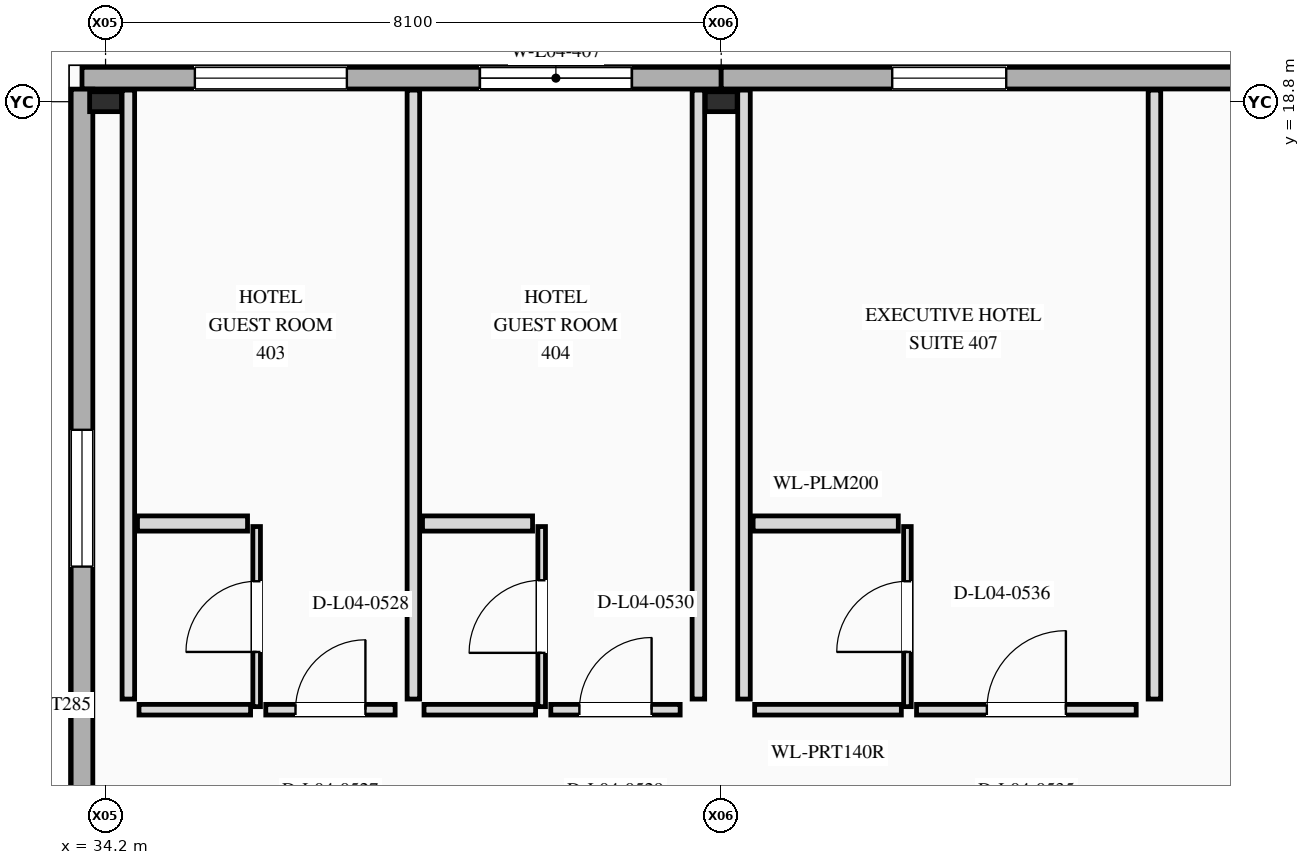
"""IFC4 building model, lengths in metres.
Left out: names, types, materials, properties, quantities, classifications, styles, units other than length and angle.
Written with IfcOpenShell. Run it as: python <this file> out.ifc"""

import sys

from ifc_helpers import new_model, si_unit, direction, frame, frame_2d, origin, origin_2d, place, context, subcontext, project, spatial, rectangle, i_section, extrude, element, fill, save


model = new_model("IFC4")
c1 = context("Model", 3, precision=1e-05, world=origin(), true_north=direction((0.0, 1.0)))
c2 = subcontext(c1, "Body", "Model", "MODEL_VIEW")
j1 = project(units=[si_unit("LENGTHUNIT", "METRE"), si_unit("PLANEANGLEUNIT", "RADIAN")], contexts=[c1])
p1 = place(None, origin())
s1 = spatial("IfcSite", under=j1, at=p1, CompositionType="ELEMENT")
p2 = place(p1, origin())
s2 = spatial("IfcBuilding", under=s1, at=p2, CompositionType="ELEMENT")
p3 = place(p2, frame((0.0, 0.0, 19.5)))
s3 = spatial("IfcBuildingStorey", under=s2, at=p3, CompositionType="ELEMENT", Elevation=19.5)
for number, where, z_axis, x_axis in (
    (1, (34.2, 18.8, 0.0), (0.0, 0.0, 1.0), (0.0, 1.0, 0.0)),
    (2, (42.3, 18.8, 0.0), (0.0, 0.0, 1.0), (0.0, 1.0, 0.0)),
):
    element("IfcColumn", number, at=place(p3, frame(where, z_axis=z_axis, x_axis=x_axis)), inside=s3, PredefinedType="COLUMN", context=c2, shape_type="SweptSolid", body=[
        extrude(i_section(OverallWidth=0.262, OverallDepth=0.419, WebThickness=0.012, FlangeThickness=0.019, at=origin_2d()), origin(), (0.0, 0.0, 1.0), 3.9),
    ])
p4 = place(p3, frame((42.3, 19.11, 0.0), z_axis=(0.0, 0.0, 1.0), x_axis=(-1.0, 0.0, 0.0)))
e3 = element("IfcWall", 3, at=p4, inside=s3, PredefinedType="STANDARD", context=c2, shape_type="SweptSolid", body=[
    extrude(rectangle(XDim=8.41, YDim=0.285, at=frame_2d((4.205, 0.0))), origin(), (0.0, 0.0, 1.0), 3.9),
])
p5 = place(p4, frame((4.925, 0.0, 0.85)))
e4 = element("IfcOpeningElement", 4, at=p5, cuts=e3, PredefinedType="OPENING", context=c2, shape_type="SweptSolid", body=[
    extrude(rectangle(XDim=2.0, YDim=1.65, at=frame_2d((1.0, 0.825))), frame((0.0, 0.152, 0.0), z_axis=(0.0, -1.0, 0.0), x_axis=(1.0, 0.0, 0.0)), (0.0, 0.0, 1.0), 0.305),
])
p6 = place(p4, frame((1.175, 0.0, 0.85)))
e5 = element("IfcOpeningElement", 5, at=p6, cuts=e3, PredefinedType="OPENING", context=c2, shape_type="SweptSolid", body=[
    extrude(rectangle(XDim=2.0, YDim=1.65, at=frame_2d((1.0, 0.825))), frame((0.0, 0.152, 0.0), z_axis=(0.0, -1.0, 0.0), x_axis=(1.0, 0.0, 0.0)), (0.0, 0.0, 1.0), 0.305),
])
p7 = place(p3, frame((50.4, 19.11, 0.0), z_axis=(0.0, 0.0, 1.0), x_axis=(-1.0, 0.0, 0.0)))
e6 = element("IfcWall", 6, at=p7, inside=s3, PredefinedType="STANDARD", context=c2, shape_type="SweptSolid", body=[
    extrude(rectangle(XDim=8.1, YDim=0.285, at=frame_2d((4.05, 0.0))), origin(), (0.0, 0.0, 1.0), 3.9),
])
p8 = place(p7, frame((4.35, 0.0, 0.85)))
e7 = element("IfcOpeningElement", 7, at=p8, cuts=e6, PredefinedType="OPENING", context=c2, shape_type="SweptSolid", body=[
    extrude(rectangle(XDim=1.5, YDim=1.7, at=frame_2d((0.75, 0.85))), frame((0.0, 0.152, 0.0), z_axis=(0.0, -1.0, 0.0), x_axis=(1.0, 0.0, 0.0)), (0.0, 0.0, 1.0), 0.305),
])
p9 = place(p3, frame((33.89, 18.966, 0.0), z_axis=(0.0, 0.0, 1.0), x_axis=(0.0, -1.0, 0.0)))
e8 = element("IfcWall", 8, at=p9, inside=s3, PredefinedType="STANDARD", context=c2, shape_type="SweptSolid", body=[
    extrude(rectangle(XDim=10.766, YDim=0.285, at=frame_2d((5.383, 0.0))), origin(), (0.0, 0.0, 1.0), 3.9),
])
p10 = place(p9, frame((4.483, 0.0, 0.88)))
e9 = element("IfcOpeningElement", 9, at=p10, cuts=e8, PredefinedType="OPENING", context=c2, shape_type="SweptSolid", body=[
    extrude(rectangle(XDim=1.8, YDim=1.8, at=frame_2d((0.9, 0.9))), frame((0.0, 0.152, 0.0), z_axis=(0.0, -1.0, 0.0), x_axis=(1.0, 0.0, 0.0)), (0.0, 0.0, 1.0), 0.305),
])
p11 = place(p3, frame((34.64, 10.8, 0.0), z_axis=(0.0, 0.0, 1.0), x_axis=(1.0, 0.0, 0.0)))
e10 = element("IfcWall", 10, at=p11, inside=s3, PredefinedType="PARTITIONING", context=c2, shape_type="SweptSolid", body=[
    extrude(rectangle(XDim=1.468, YDim=0.14, at=frame_2d((0.734, 0.0))), origin(), (0.0, 0.0, 1.0), 3.585),
])
p12 = place(p3, frame((36.308, 10.8, 0.0), z_axis=(0.0, 0.0, 1.0), x_axis=(1.0, 0.0, 0.0)))
e11 = element("IfcWall", 11, at=p12, inside=s3, PredefinedType="PARTITIONING", context=c2, shape_type="SweptSolid", body=[
    extrude(rectangle(XDim=1.702, YDim=0.14, at=frame_2d((0.851, 0.0))), origin(), (0.0, 0.0, 1.0), 3.585),
])
p13 = place(p12, frame((0.391, 0.0, 0.0)))
e12 = element("IfcOpeningElement", 12, at=p13, cuts=e11, PredefinedType="OPENING", context=c2, shape_type="SweptSolid", body=[
    extrude(rectangle(XDim=0.92, YDim=2.3, at=frame_2d((0.46, 1.15))), frame((0.0, 0.08, 0.0), z_axis=(0.0, -1.0, 0.0), x_axis=(1.0, 0.0, 0.0)), (0.0, 0.0, 1.0), 0.16),
])
p14 = place(p3, frame((34.5, 10.94, 0.0), z_axis=(0.0, 0.0, 1.0), x_axis=(0.0, 1.0, 0.0)))
e13 = element("IfcWall", 13, at=p14, inside=s3, PredefinedType="PARTITIONING", context=c2, shape_type="SweptSolid", body=[
    extrude(rectangle(XDim=8.012, YDim=0.165, at=frame_2d((4.006, 0.0))), origin(), (0.0, 0.0, 1.0), 2.914),
])
p15 = place(p3, frame((38.25, 10.94, 0.0), z_axis=(0.0, 0.0, 1.0), x_axis=(0.0, 1.0, 0.0)))
e14 = element("IfcWall", 14, at=p15, inside=s3, PredefinedType="PARTITIONING", context=c2, shape_type="SweptSolid", body=[
    extrude(rectangle(XDim=8.012, YDim=0.165, at=frame_2d((4.006, 0.0))), origin(), (0.0, 0.0, 1.0), 2.998),
])
p16 = place(p3, frame((36.188, 10.84, 0.0), z_axis=(0.0, 0.0, 1.0), x_axis=(0.0, 1.0, 0.0)))
e15 = element("IfcWall", 15, at=p16, inside=s3, PredefinedType="PARTITIONING", context=c2, shape_type="SweptSolid", body=[
    extrude(rectangle(XDim=2.37, YDim=0.1, at=frame_2d((1.185, 0.0))), origin(), (0.0, 0.0, 1.0), 3.254),
])
p17 = place(p16, frame((0.72, 0.0, 0.0)))
e16 = element("IfcOpeningElement", 16, at=p17, cuts=e15, PredefinedType="OPENING", context=c2, shape_type="SweptSolid", body=[
    extrude(rectangle(XDim=0.93, YDim=2.22, at=frame_2d((0.465, 1.11))), frame((0.0, 0.06, 0.0), z_axis=(0.0, -1.0, 0.0), x_axis=(1.0, 0.0, 0.0)), (0.0, 0.0, 1.0), 0.12),
])
p18 = place(p3, frame((34.62, 13.25, 0.0), z_axis=(0.0, 0.0, 1.0), x_axis=(1.0, 0.0, 0.0)))
e17 = element("IfcWall", 17, at=p18, inside=s3, PredefinedType="PLUMBINGWALL", context=c2, shape_type="SweptSolid", body=[
    extrude(rectangle(XDim=1.448, YDim=0.2, at=frame_2d((0.724, 0.0))), origin(), (0.0, 0.0, 1.0), 3.585),
])
p19 = place(p3, frame((38.39, 10.8, 0.0), z_axis=(0.0, 0.0, 1.0), x_axis=(1.0, 0.0, 0.0)))
e18 = element("IfcWall", 18, at=p19, inside=s3, PredefinedType="PARTITIONING", context=c2, shape_type="SweptSolid", body=[
    extrude(rectangle(XDim=1.468, YDim=0.14, at=frame_2d((0.734, 0.0))), origin(), (0.0, 0.0, 1.0), 3.585),
])
p20 = place(p3, frame((40.058, 10.8, 0.0), z_axis=(0.0, 0.0, 1.0), x_axis=(1.0, 0.0, 0.0)))
e19 = element("IfcWall", 19, at=p20, inside=s3, PredefinedType="PARTITIONING", context=c2, shape_type="SweptSolid", body=[
    extrude(rectangle(XDim=1.702, YDim=0.14, at=frame_2d((0.851, 0.0))), origin(), (0.0, 0.0, 1.0), 3.585),
])
p21 = place(p20, frame((0.376, 0.0, 0.0)))
e20 = element("IfcOpeningElement", 20, at=p21, cuts=e19, PredefinedType="OPENING", context=c2, shape_type="SweptSolid", body=[
    extrude(rectangle(XDim=0.95, YDim=2.3, at=frame_2d((0.475, 1.15))), frame((0.0, 0.08, 0.0), z_axis=(0.0, -1.0, 0.0), x_axis=(1.0, 0.0, 0.0)), (0.0, 0.0, 1.0), 0.16),
])
p22 = place(p3, frame((42.0, 10.94, 0.0), z_axis=(0.0, 0.0, 1.0), x_axis=(0.0, 1.0, 0.0)))
e21 = element("IfcWall", 21, at=p22, inside=s3, PredefinedType="PARTITIONING", context=c2, shape_type="SweptSolid", body=[
    extrude(rectangle(XDim=8.012, YDim=0.165, at=frame_2d((4.006, 0.0))), origin(), (0.0, 0.0, 1.0), 2.914),
])
p23 = place(p3, frame((39.938, 10.84, 0.0), z_axis=(0.0, 0.0, 1.0), x_axis=(0.0, 1.0, 0.0)))
e22 = element("IfcWall", 22, at=p23, inside=s3, PredefinedType="PARTITIONING", context=c2, shape_type="SweptSolid", body=[
    extrude(rectangle(XDim=2.37, YDim=0.1, at=frame_2d((1.185, 0.0))), origin(), (0.0, 0.0, 1.0), 3.254),
])
p24 = place(p23, frame((0.708, 0.0, 0.0)))
e23 = element("IfcOpeningElement", 23, at=p24, cuts=e22, PredefinedType="OPENING", context=c2, shape_type="SweptSolid", body=[
    extrude(rectangle(XDim=0.955, YDim=2.22, at=frame_2d((0.478, 1.11))), frame((0.0, 0.06, 0.0), z_axis=(0.0, -1.0, 0.0), x_axis=(1.0, 0.0, 0.0)), (0.0, 0.0, 1.0), 0.12),
])
p25 = place(p3, frame((38.37, 13.25, 0.0), z_axis=(0.0, 0.0, 1.0), x_axis=(1.0, 0.0, 0.0)))
e24 = element("IfcWall", 24, at=p25, inside=s3, PredefinedType="PLUMBINGWALL", context=c2, shape_type="SweptSolid", body=[
    extrude(rectangle(XDim=1.448, YDim=0.2, at=frame_2d((0.724, 0.0))), origin(), (0.0, 0.0, 1.0), 3.585),
])
p26 = place(p3, frame((42.74, 10.8, 0.0), z_axis=(0.0, 0.0, 1.0), x_axis=(1.0, 0.0, 0.0)))
e25 = element("IfcWall", 25, at=p26, inside=s3, PredefinedType="PARTITIONING", context=c2, shape_type="SweptSolid", body=[
    extrude(rectangle(XDim=1.93, YDim=0.14, at=frame_2d((0.965, 0.0))), origin(), (0.0, 0.0, 1.0), 3.585),
])
p27 = place(p3, frame((44.87, 10.8, 0.0), z_axis=(0.0, 0.0, 1.0), x_axis=(1.0, 0.0, 0.0)))
e26 = element("IfcWall", 26, at=p27, inside=s3, PredefinedType="PARTITIONING", context=c2, shape_type="SweptSolid", body=[
    extrude(rectangle(XDim=2.89, YDim=0.14, at=frame_2d((1.445, 0.0))), origin(), (0.0, 0.0, 1.0), 3.585),
])
p28 = place(p27, frame((0.925, 0.0, 0.0)))
e27 = element("IfcOpeningElement", 27, at=p28, cuts=e26, PredefinedType="OPENING", context=c2, shape_type="SweptSolid", body=[
    extrude(rectangle(XDim=1.04, YDim=2.4, at=frame_2d((0.52, 1.2))), frame((0.0, 0.08, 0.0), z_axis=(0.0, -1.0, 0.0), x_axis=(1.0, 0.0, 0.0)), (0.0, 0.0, 1.0), 0.16),
])
p29 = place(p3, frame((42.6, 10.94, 0.0), z_axis=(0.0, 0.0, 1.0), x_axis=(0.0, 1.0, 0.0)))
e28 = element("IfcWall", 28, at=p29, inside=s3, PredefinedType="PARTITIONING", context=c2, shape_type="SweptSolid", body=[
    extrude(rectangle(XDim=8.012, YDim=0.165, at=frame_2d((4.006, 0.0))), origin(), (0.0, 0.0, 1.0), 2.914),
])
p30 = place(p3, frame((48.0, 10.94, 0.0), z_axis=(0.0, 0.0, 1.0), x_axis=(0.0, 1.0, 0.0)))
e29 = element("IfcWall", 29, at=p30, inside=s3, PredefinedType="PARTITIONING", context=c2, shape_type="SweptSolid", body=[
    extrude(rectangle(XDim=8.012, YDim=0.165, at=frame_2d((4.006, 0.0))), origin(), (0.0, 0.0, 1.0), 3.585),
])
p31 = place(p3, frame((44.75, 10.84, 0.0), z_axis=(0.0, 0.0, 1.0), x_axis=(0.0, 1.0, 0.0)))
e30 = element("IfcWall", 30, at=p31, inside=s3, PredefinedType="PARTITIONING", context=c2, shape_type="SweptSolid", body=[
    extrude(rectangle(XDim=2.37, YDim=0.1, at=frame_2d((1.185, 0.0))), origin(), (0.0, 0.0, 1.0), 3.585),
])
p32 = place(p31, frame((0.72, 0.0, 0.0)))
e31 = element("IfcOpeningElement", 31, at=p32, cuts=e30, PredefinedType="OPENING", context=c2, shape_type="SweptSolid", body=[
    extrude(rectangle(XDim=0.93, YDim=2.14, at=frame_2d((0.465, 1.07))), frame((0.0, 0.06, 0.0), z_axis=(0.0, -1.0, 0.0), x_axis=(1.0, 0.0, 0.0)), (0.0, 0.0, 1.0), 0.12),
])
p33 = place(p3, frame((42.72, 13.25, 0.0), z_axis=(0.0, 0.0, 1.0), x_axis=(1.0, 0.0, 0.0)))
e32 = element("IfcWall", 32, at=p33, inside=s3, PredefinedType="PLUMBINGWALL", context=c2, shape_type="SweptSolid", body=[
    extrude(rectangle(XDim=1.91, YDim=0.2, at=frame_2d((0.955, 0.0))), origin(), (0.0, 0.0, 1.0), 3.585),
])
p34 = place(p5, origin())
e33 = element("IfcWindow", 33, at=p34, inside=s3, PartitioningType="SINGLE_PANEL", PredefinedType="WINDOW", context=c2, shape_type="SweptSolid", body=[
    extrude(rectangle(XDim=2.0, YDim=1.65, at=frame_2d((1.0, 0.825))), frame((0.0, 0.03, 0.0), z_axis=(0.0, -1.0, 0.0), x_axis=(1.0, 0.0, 0.0)), (0.0, 0.0, 1.0), 0.06),
])
fill(e4, e33)
p35 = place(p6, origin())
e34 = element("IfcWindow", 34, at=p35, inside=s3, PartitioningType="SINGLE_PANEL", PredefinedType="WINDOW", context=c2, shape_type="SweptSolid", body=[
    extrude(rectangle(XDim=2.0, YDim=1.65, at=frame_2d((1.0, 0.825))), frame((0.0, 0.03, 0.0), z_axis=(0.0, -1.0, 0.0), x_axis=(1.0, 0.0, 0.0)), (0.0, 0.0, 1.0), 0.06),
])
fill(e5, e34)
p36 = place(p8, origin())
e35 = element("IfcWindow", 35, at=p36, inside=s3, PartitioningType="SINGLE_PANEL", PredefinedType="WINDOW", context=c2, shape_type="SweptSolid", body=[
    extrude(rectangle(XDim=1.5, YDim=1.7, at=frame_2d((0.75, 0.85))), frame((0.0, 0.03, 0.0), z_axis=(0.0, -1.0, 0.0), x_axis=(1.0, 0.0, 0.0)), (0.0, 0.0, 1.0), 0.06),
])
fill(e7, e35)
p37 = place(p10, origin())
e36 = element("IfcWindow", 36, at=p37, inside=s3, PartitioningType="SINGLE_PANEL", PredefinedType="WINDOW", context=c2, shape_type="SweptSolid", body=[
    extrude(rectangle(XDim=1.8, YDim=1.8, at=frame_2d((0.9, 0.9))), frame((0.0, 0.03, 0.0), z_axis=(0.0, -1.0, 0.0), x_axis=(1.0, 0.0, 0.0)), (0.0, 0.0, 1.0), 0.06),
])
fill(e9, e36)
p38 = place(p13, origin())
e37 = element("IfcDoor", 37, at=p38, inside=s3, OperationType="SINGLE_SWING_RIGHT", PredefinedType="DOOR", context=c2, shape_type="SweptSolid", body=[
    extrude(rectangle(XDim=0.92, YDim=2.3, at=frame_2d((0.46, 1.15))), frame((0.0, 0.025, 0.0), z_axis=(0.0, -1.0, 0.0), x_axis=(1.0, 0.0, 0.0)), (0.0, 0.0, 1.0), 0.05),
])
fill(e12, e37)
p39 = place(p17, origin())
e38 = element("IfcDoor", 38, at=p39, inside=s3, OperationType="SINGLE_SWING_LEFT", PredefinedType="DOOR", context=c2, shape_type="SweptSolid", body=[
    extrude(rectangle(XDim=0.93, YDim=2.22, at=frame_2d((0.465, 1.11))), frame((0.0, 0.025, 0.0), z_axis=(0.0, -1.0, 0.0), x_axis=(1.0, 0.0, 0.0)), (0.0, 0.0, 1.0), 0.05),
])
fill(e16, e38)
p40 = place(p21, origin())
e39 = element("IfcDoor", 39, at=p40, inside=s3, OperationType="SINGLE_SWING_RIGHT", PredefinedType="DOOR", context=c2, shape_type="SweptSolid", body=[
    extrude(rectangle(XDim=0.95, YDim=2.3, at=frame_2d((0.475, 1.15))), frame((0.0, 0.025, 0.0), z_axis=(0.0, -1.0, 0.0), x_axis=(1.0, 0.0, 0.0)), (0.0, 0.0, 1.0), 0.05),
])
fill(e20, e39)
p41 = place(p24, origin())
e40 = element("IfcDoor", 40, at=p41, inside=s3, OperationType="SINGLE_SWING_LEFT", PredefinedType="DOOR", context=c2, shape_type="SweptSolid", body=[
    extrude(rectangle(XDim=0.955, YDim=2.22, at=frame_2d((0.478, 1.11))), frame((0.0, 0.025, 0.0), z_axis=(0.0, -1.0, 0.0), x_axis=(1.0, 0.0, 0.0)), (0.0, 0.0, 1.0), 0.05),
])
fill(e23, e40)
p42 = place(p28, origin())
e41 = element("IfcDoor", 41, at=p42, inside=s3, OperationType="SINGLE_SWING_RIGHT", PredefinedType="DOOR", context=c2, shape_type="SweptSolid", body=[
    extrude(rectangle(XDim=1.04, YDim=2.4, at=frame_2d((0.52, 1.2))), frame((0.0, 0.025, 0.0), z_axis=(0.0, -1.0, 0.0), x_axis=(1.0, 0.0, 0.0)), (0.0, 0.0, 1.0), 0.05),
])
fill(e27, e41)
p43 = place(p32, origin())
e42 = element("IfcDoor", 42, at=p43, inside=s3, OperationType="SINGLE_SWING_LEFT", PredefinedType="DOOR", context=c2, shape_type="SweptSolid", body=[
    extrude(rectangle(XDim=0.93, YDim=2.14, at=frame_2d((0.465, 1.07))), frame((0.0, 0.025, 0.0), z_axis=(0.0, -1.0, 0.0), x_axis=(1.0, 0.0, 0.0)), (0.0, 0.0, 1.0), 0.05),
])
fill(e31, e42)
save(model, sys.argv[1])
